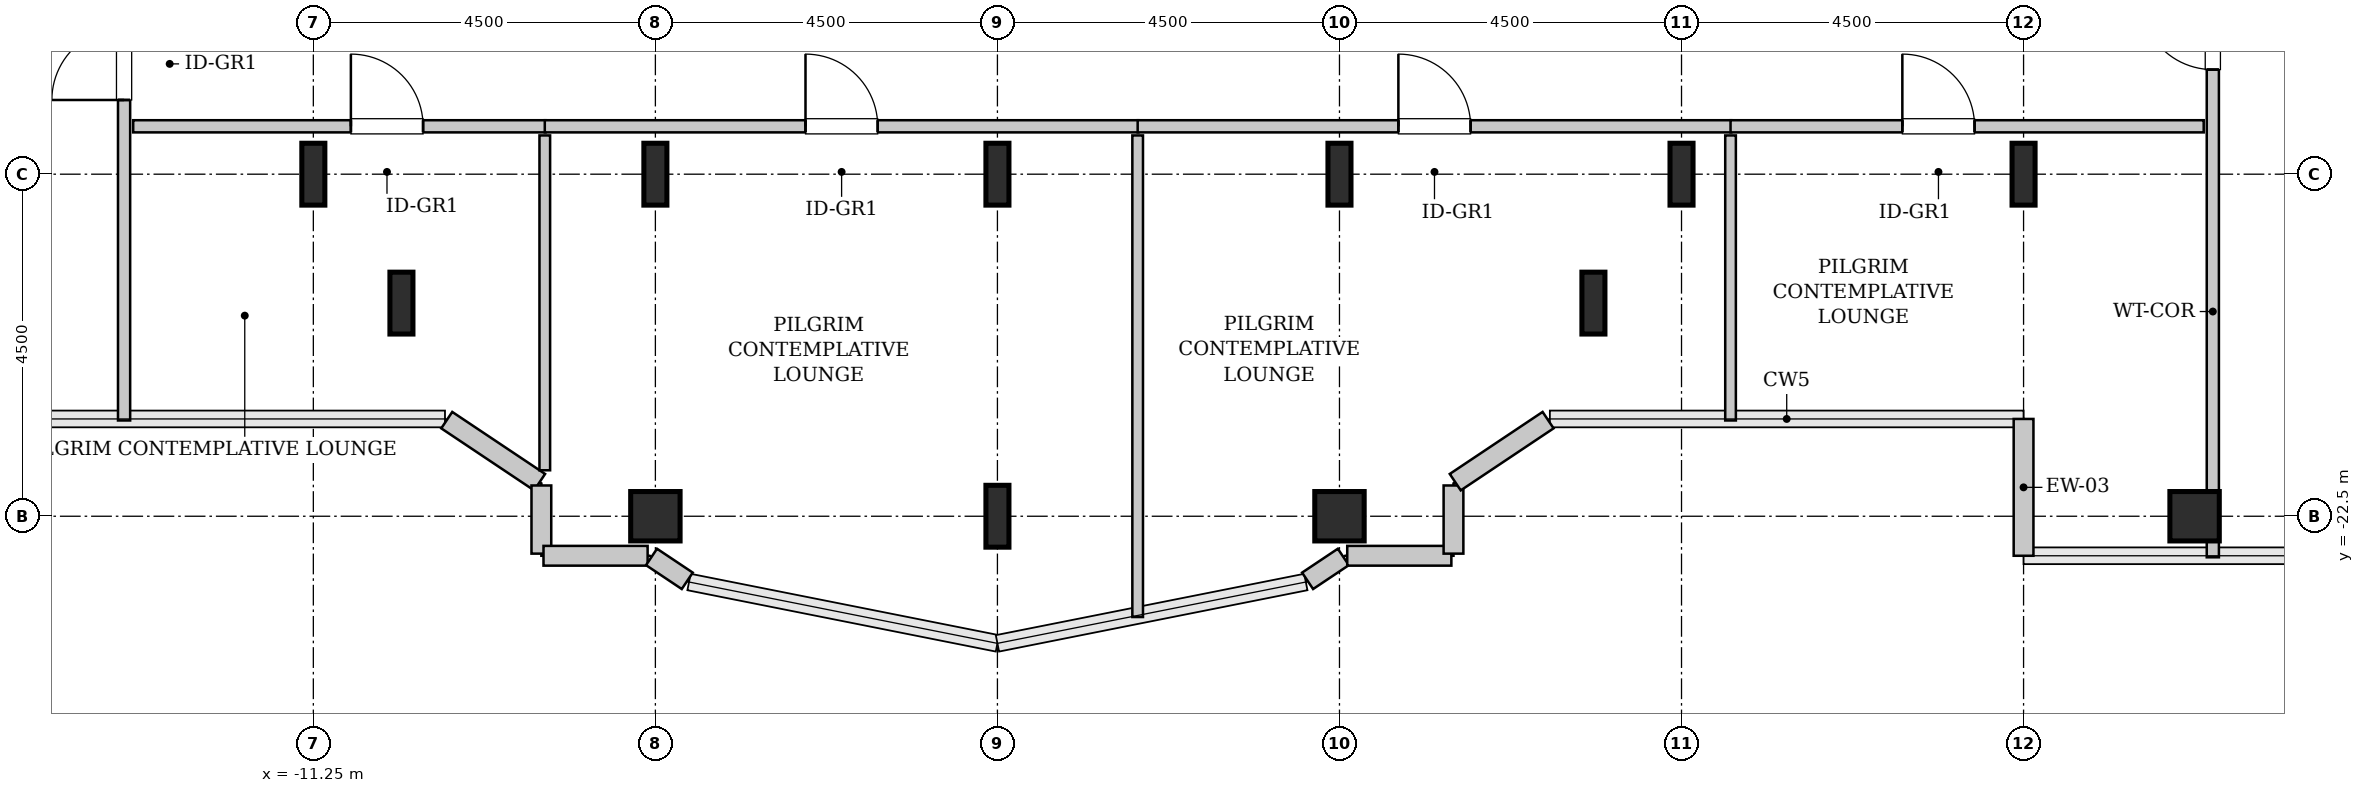
"""IFC4 building model, lengths in metres.
Left out: names, types, materials, properties, quantities, classifications, styles, units other than length and angle.
Written with IfcOpenShell. Run it as: python <this file> out.ifc"""

import sys

from ifc_helpers import new_model, si_unit, direction, frame, frame_2d, origin, origin_2d, place, context, subcontext, project, spatial, rectangle, hollow_rectangle, i_section, extrude, source, transform, mapped, element, fill, save


model = new_model("IFC4")
c1 = context("Model", 3, precision=1e-05, world=origin(), true_north=direction((0.0, 1.0)))
c2 = subcontext(c1, "Body", "Model", "MODEL_VIEW")
j1 = project(units=[si_unit("LENGTHUNIT", "METRE"), si_unit("PLANEANGLEUNIT", "RADIAN")], contexts=[c1])
p1 = place(None, origin())
s1 = spatial("IfcSite", under=j1, at=p1, CompositionType="ELEMENT")
p2 = place(p1, origin())
s2 = spatial("IfcBuilding", under=s1, at=p2, CompositionType="ELEMENT")
p3 = place(p2, frame((0.0, 0.0, 214.2)))
s3 = spatial("IfcBuildingStorey", under=s2, at=p3, CompositionType="ELEMENT", Elevation=214.2)
m1 = source(origin(), c2, "Body", "SweptSolid", [
    extrude(i_section(OverallWidth=0.303, OverallDepth=0.814, WebThickness=0.021, FlangeThickness=0.04, FilletRadius=0.03, at=origin_2d()), origin(), (0.0, 0.0, 1.0), 3.8),
])
for number, where, z_axis, x_axis in (
    (1, (-11.25, -18.0, 0.0), (0.0, 0.0, 1.0), (1.0, 0.0, 0.0)),
    (2, (-10.091, -19.696, 0.0), (0.0, 0.0, 1.0), (1.0, 0.0, 0.0)),
):
    element("IfcColumn", number, at=place(p3, frame(where, z_axis=z_axis, x_axis=x_axis)), inside=s3, PredefinedType="COLUMN", context=c2, shape_type="MappedRepresentation", body=[
        mapped(m1, transform((0.0, 0.0, 0.0), x_axis=(1.0, 0.0, 0.0), y_axis=(0.0, 1.0, 0.0), z_axis=(0.0, 0.0, 1.0), scale=1.0)),
    ])
m2 = source(origin(), c2, "Body", "SweptSolid", [
    extrude(hollow_rectangle(XDim=0.65, YDim=0.65, WallThickness=0.032, InnerFilletRadius=0.032, OuterFilletRadius=0.064, at=origin_2d()), origin(), (0.0, 0.0, 1.0), 3.8),
])
p4 = place(p3, frame((-6.75, -22.5, 0.0), z_axis=(0.0, 0.0, 1.0), x_axis=(1.0, 0.0, 0.0)))
e3 = element("IfcColumn", 3, at=p4, inside=s3, PredefinedType="COLUMN", context=c2, shape_type="MappedRepresentation", body=[
    mapped(m2, transform((0.0, 0.0, 0.0), x_axis=(1.0, 0.0, 0.0), y_axis=(0.0, 1.0, 0.0), z_axis=(0.0, 0.0, 1.0), scale=1.0)),
])
for number, where, z_axis, x_axis in (
    (4, (-6.75, -18.0, 0.0), (0.0, 0.0, 1.0), (1.0, 0.0, 0.0)),
    (5, (-2.25, -22.5, 0.0), (0.0, 0.0, 1.0), (1.0, 0.0, 0.0)),
    (6, (-2.25, -18.0, 0.0), (0.0, 0.0, 1.0), (1.0, 0.0, 0.0)),
):
    element("IfcColumn", number, at=place(p3, frame(where, z_axis=z_axis, x_axis=x_axis)), inside=s3, PredefinedType="COLUMN", context=c2, shape_type="MappedRepresentation", body=[
        mapped(m1, transform((0.0, 0.0, 0.0), x_axis=(1.0, 0.0, 0.0), y_axis=(0.0, 1.0, 0.0), z_axis=(0.0, 0.0, 1.0), scale=1.0)),
    ])
p5 = place(p3, frame((2.25, -22.5, 0.0), z_axis=(0.0, 0.0, 1.0), x_axis=(1.0, 0.0, 0.0)))
e7 = element("IfcColumn", 7, at=p5, inside=s3, PredefinedType="COLUMN", context=c2, shape_type="MappedRepresentation", body=[
    mapped(m2, transform((0.0, 0.0, 0.0), x_axis=(1.0, 0.0, 0.0), y_axis=(0.0, 1.0, 0.0), z_axis=(0.0, 0.0, 1.0), scale=1.0)),
])
for number, where, z_axis, x_axis in (
    (8, (2.25, -18.0, 0.0), (0.0, 0.0, 1.0), (1.0, 0.0, 0.0)),
    (9, (5.591, -19.696, 0.0), (0.0, 0.0, 1.0), (1.0, 0.0, 0.0)),
    (10, (6.75, -18.0, 0.0), (0.0, 0.0, 1.0), (1.0, 0.0, 0.0)),
    (11, (11.25, -18.0, 0.0), (0.0, 0.0, 1.0), (1.0, 0.0, 0.0)),
):
    element("IfcColumn", number, at=place(p3, frame(where, z_axis=z_axis, x_axis=x_axis)), inside=s3, PredefinedType="COLUMN", context=c2, shape_type="MappedRepresentation", body=[
        mapped(m1, transform((0.0, 0.0, 0.0), x_axis=(1.0, 0.0, 0.0), y_axis=(0.0, 1.0, 0.0), z_axis=(0.0, 0.0, 1.0), scale=1.0)),
    ])
p6 = place(p3, frame((13.5, -22.5, 0.0), z_axis=(0.0, 0.0, 1.0), x_axis=(1.0, 0.0, 0.0)))
e12 = element("IfcColumn", 12, at=p6, inside=s3, PredefinedType="COLUMN", context=c2, shape_type="MappedRepresentation", body=[
    mapped(m2, transform((0.0, 0.0, 0.0), x_axis=(1.0, 0.0, 0.0), y_axis=(0.0, 1.0, 0.0), z_axis=(0.0, 0.0, 1.0), scale=1.0)),
])
m3 = source(origin(), c2, "Body", "SweptSolid", [
    extrude(rectangle(XDim=1.8, YDim=0.26, at=frame_2d((0.9, 0.0))), origin(), (0.0, 0.0, 1.0), 3.55),
])
p7 = place(p3, frame((11.25, -21.22, 0.0), z_axis=(0.0, 0.0, 1.0), x_axis=(0.0, -1.0, 0.0)))
e13 = element("IfcWall", 13, at=p7, inside=s3, PredefinedType="SOLIDWALL", context=c2, shape_type="MappedRepresentation", body=[
    mapped(m3, transform((0.0, 0.0, 0.0), x_axis=(1.0, 0.0, 0.0), y_axis=(0.0, 1.0, 0.0), z_axis=(0.0, 0.0, 1.0), scale=1.0)),
])
m4 = source(origin(), c2, "Body", "SweptSolid", [
    extrude(rectangle(XDim=1.469, YDim=0.26, at=frame_2d((0.734, 0.0))), origin(), (0.0, 0.0, 1.0), 3.55),
])
p8 = place(p3, frame((-9.495, -21.236, 0.0), z_axis=(0.0, 0.0, 1.0), x_axis=(0.831461760506, -0.555581983884, 0.0)))
e14 = element("IfcWall", 14, at=p8, inside=s3, PredefinedType="SOLIDWALL", context=c2, shape_type="MappedRepresentation", body=[
    mapped(m4, transform((0.0, 0.0, 0.0), x_axis=(1.0, 0.0, 0.0), y_axis=(0.0, 1.0, 0.0), z_axis=(0.0, 0.0, 1.0), scale=1.0)),
])
m5 = source(origin(), c2, "Body", "SweptSolid", [
    extrude(rectangle(XDim=0.897, YDim=0.26, at=frame_2d((0.448, 0.0))), origin(), (0.0, 0.0, 1.0), 3.55),
])
p9 = place(p3, frame((-8.25, -22.095, 0.0), z_axis=(0.0, 0.0, 1.0), x_axis=(0.0, -1.0, 0.0)))
e15 = element("IfcWall", 15, at=p9, inside=s3, PredefinedType="SOLIDWALL", context=c2, shape_type="MappedRepresentation", body=[
    mapped(m5, transform((0.0, 0.0, 0.0), x_axis=(1.0, 0.0, 0.0), y_axis=(0.0, 1.0, 0.0), z_axis=(0.0, 0.0, 1.0), scale=1.0)),
])
m6 = source(origin(), c2, "Body", "SweptSolid", [
    extrude(rectangle(XDim=1.37, YDim=0.26, at=frame_2d((0.685, 0.0))), origin(), (0.0, 0.0, 1.0), 3.55),
])
p10 = place(p3, frame((-8.222, -23.02, 0.0), z_axis=(0.0, 0.0, 1.0), x_axis=(1.0, 0.0, 0.0)))
e16 = element("IfcWall", 16, at=p10, inside=s3, PredefinedType="SOLIDWALL", context=c2, shape_type="MappedRepresentation", body=[
    mapped(m6, transform((0.0, 0.0, 0.0), x_axis=(1.0, 0.0, 0.0), y_axis=(0.0, 1.0, 0.0), z_axis=(0.0, 0.0, 1.0), scale=1.0)),
])
m7 = source(origin(), c2, "Body", "SweptSolid", [
    extrude(rectangle(XDim=0.565, YDim=0.26, at=frame_2d((0.283, 0.0))), origin(), (0.0, 0.0, 1.0), 3.55),
])
for number, where, z_axis, x_axis in (
    (17, (-6.801, -23.036, 0.0), (0.0, 0.0, 1.0), (0.832, -0.555, 0.0)),
    (18, (1.831, -23.35, 0.0), (0.0, 0.0, 1.0), (0.832, 0.555, 0.0)),
):
    element("IfcWall", number, at=place(p3, frame(where, z_axis=z_axis, x_axis=x_axis)), inside=s3, PredefinedType="SOLIDWALL", context=c2, shape_type="MappedRepresentation", body=[
        mapped(m7, transform((0.0, 0.0, 0.0), x_axis=(1.0, 0.0, 0.0), y_axis=(0.0, 1.0, 0.0), z_axis=(0.0, 0.0, 1.0), scale=1.0)),
    ])
p11 = place(p3, frame((2.352, -23.02, 0.0), z_axis=(0.0, 0.0, 1.0), x_axis=(1.0, 0.0, 0.0)))
e19 = element("IfcWall", 19, at=p11, inside=s3, PredefinedType="SOLIDWALL", context=c2, shape_type="MappedRepresentation", body=[
    mapped(m6, transform((0.0, 0.0, 0.0), x_axis=(1.0, 0.0, 0.0), y_axis=(0.0, 1.0, 0.0), z_axis=(0.0, 0.0, 1.0), scale=1.0)),
])
p12 = place(p3, frame((3.75, -22.992, 0.0), z_axis=(0.0, 0.0, 1.0), x_axis=(0.0, 1.0, 0.0)))
e20 = element("IfcWall", 20, at=p12, inside=s3, PredefinedType="SOLIDWALL", context=c2, shape_type="MappedRepresentation", body=[
    mapped(m5, transform((0.0, 0.0, 0.0), x_axis=(1.0, 0.0, 0.0), y_axis=(0.0, 1.0, 0.0), z_axis=(0.0, 0.0, 1.0), scale=1.0)),
])
p13 = place(p3, frame((3.773, -22.052, 0.0), z_axis=(0.0, 0.0, 1.0), x_axis=(0.831461760506, 0.555581983884, 0.0)))
e21 = element("IfcWall", 21, at=p13, inside=s3, PredefinedType="SOLIDWALL", context=c2, shape_type="MappedRepresentation", body=[
    mapped(m4, transform((0.0, 0.0, 0.0), x_axis=(1.0, 0.0, 0.0), y_axis=(0.0, 1.0, 0.0), z_axis=(0.0, 0.0, 1.0), scale=1.0)),
])
m8 = source(origin(), c2, "Body", "SweptSolid", [
    extrude(rectangle(XDim=5.552, YDim=0.16, at=frame_2d((2.776, 0.0))), origin(), (0.0, 0.0, 1.0), 3.535),
])
p14 = place(p3, frame((-13.74, -21.24, 0.0), z_axis=(0.0, 0.0, 1.0), x_axis=(0.0, 1.0, 0.0)))
e22 = element("IfcWall", 22, at=p14, inside=s3, PredefinedType="PARTITIONING", context=c2, shape_type="MappedRepresentation", body=[
    mapped(m8, transform((0.0, 0.0, 0.0), x_axis=(1.0, 0.0, 0.0), y_axis=(0.0, 1.0, 0.0), z_axis=(0.0, 0.0, 1.0), scale=1.0)),
])
p15 = place(p14, frame((4.216, 0.0, 0.0)))
e23 = element("IfcOpeningElement", 23, at=p15, cuts=e22, PredefinedType="OPENING", context=c2, shape_type="SweptSolid", body=[
    extrude(rectangle(XDim=0.95, YDim=2.1, at=frame_2d((0.475, 1.05))), frame((0.0, 0.09, 0.0), z_axis=(0.0, -1.0, 0.0), x_axis=(1.0, 0.0, 0.0)), (0.0, 0.0, 1.0), 0.18),
])
m9 = source(origin(), c2, "Body", "SweptSolid", [
    extrude(rectangle(XDim=8.153, YDim=0.16, at=frame_2d((4.076, 0.0))), origin(), (0.0, 0.0, 1.0), 3.535),
])
p16 = place(p3, frame((13.74, -23.04, 0.0), z_axis=(0.0, 0.0, 1.0), x_axis=(0.0, 1.0, 0.0)))
e24 = element("IfcWall", 24, at=p16, inside=s3, PredefinedType="PARTITIONING", context=c2, shape_type="MappedRepresentation", body=[
    mapped(m9, transform((0.0, 0.0, 0.0), x_axis=(1.0, 0.0, 0.0), y_axis=(0.0, 1.0, 0.0), z_axis=(0.0, 0.0, 1.0), scale=1.0)),
])
p17 = place(p16, frame((6.416, 0.0, 0.0)))
e25 = element("IfcOpeningElement", 25, at=p17, cuts=e24, PredefinedType="OPENING", context=c2, shape_type="SweptSolid", body=[
    extrude(rectangle(XDim=0.95, YDim=2.1, at=frame_2d((0.475, 1.05))), frame((0.0, 0.09, 0.0), z_axis=(0.0, -1.0, 0.0), x_axis=(1.0, 0.0, 0.0)), (0.0, 0.0, 1.0), 0.18),
])
m10 = source(origin(), c2, "Body", "SweptSolid", [
    extrude(rectangle(XDim=5.425, YDim=0.16, at=frame_2d((2.712, 0.0))), origin(), (0.0, 0.0, 1.0), 3.535),
])
p18 = place(p3, frame((-13.62, -17.37, 0.0), z_axis=(0.0, 0.0, 1.0), x_axis=(1.0, 0.0, 0.0)))
e26 = element("IfcWall", 26, at=p18, inside=s3, PredefinedType="PARTITIONING", context=c2, shape_type="MappedRepresentation", body=[
    mapped(m10, transform((0.0, 0.0, 0.0), x_axis=(1.0, 0.0, 0.0), y_axis=(0.0, 1.0, 0.0), z_axis=(0.0, 0.0, 1.0), scale=1.0)),
])
p19 = place(p18, frame((2.864, 0.0, 0.0)))
e27 = element("IfcOpeningElement", 27, at=p19, cuts=e26, PredefinedType="OPENING", context=c2, shape_type="SweptSolid", body=[
    extrude(rectangle(XDim=0.95, YDim=2.1, at=frame_2d((0.475, 1.05))), frame((0.0, 0.09, 0.0), z_axis=(0.0, -1.0, 0.0), x_axis=(1.0, 0.0, 0.0)), (0.0, 0.0, 1.0), 0.18),
])
m11 = source(origin(), c2, "Body", "SweptSolid", [
    extrude(rectangle(XDim=4.405, YDim=0.14, at=frame_2d((2.203, 0.0))), origin(), (0.0, 0.0, 1.0), 3.535),
])
p20 = place(p3, frame((-8.205, -21.895, 0.0), z_axis=(0.0, 0.0, 1.0), x_axis=(0.0, 1.0, 0.0)))
e28 = element("IfcWall", 28, at=p20, inside=s3, PredefinedType="PARTITIONING", context=c2, shape_type="MappedRepresentation", body=[
    mapped(m11, transform((0.0, 0.0, 0.0), x_axis=(1.0, 0.0, 0.0), y_axis=(0.0, 1.0, 0.0), z_axis=(0.0, 0.0, 1.0), scale=1.0)),
])
m12 = source(origin(), c2, "Body", "SweptSolid", [
    extrude(rectangle(XDim=7.81, YDim=0.16, at=frame_2d((3.905, 0.0))), origin(), (0.0, 0.0, 1.0), 3.535),
])
p21 = place(p3, frame((-8.205, -17.37, 0.0), z_axis=(0.0, 0.0, 1.0), x_axis=(1.0, 0.0, 0.0)))
e29 = element("IfcWall", 29, at=p21, inside=s3, PredefinedType="PARTITIONING", context=c2, shape_type="MappedRepresentation", body=[
    mapped(m12, transform((0.0, 0.0, 0.0), x_axis=(1.0, 0.0, 0.0), y_axis=(0.0, 1.0, 0.0), z_axis=(0.0, 0.0, 1.0), scale=1.0)),
])
p22 = place(p21, frame((3.43, 0.0, 0.0)))
e30 = element("IfcOpeningElement", 30, at=p22, cuts=e29, PredefinedType="OPENING", context=c2, shape_type="SweptSolid", body=[
    extrude(rectangle(XDim=0.95, YDim=2.1, at=frame_2d((0.475, 1.05))), frame((0.0, 0.09, 0.0), z_axis=(0.0, -1.0, 0.0), x_axis=(1.0, 0.0, 0.0)), (0.0, 0.0, 1.0), 0.18),
])
m13 = source(origin(), c2, "Body", "SweptSolid", [
    extrude(rectangle(XDim=6.336, YDim=0.14, at=frame_2d((3.168, 0.0))), origin(), (0.0, 0.0, 1.0), 3.535),
])
p23 = place(p3, frame((-0.405, -23.826, 0.0), z_axis=(0.0, 0.0, 1.0), x_axis=(0.0, 1.0, 0.0)))
e31 = element("IfcWall", 31, at=p23, inside=s3, PredefinedType="PARTITIONING", context=c2, shape_type="MappedRepresentation", body=[
    mapped(m13, transform((0.0, 0.0, 0.0), x_axis=(1.0, 0.0, 0.0), y_axis=(0.0, 1.0, 0.0), z_axis=(0.0, 0.0, 1.0), scale=1.0)),
])
p24 = place(p3, frame((-0.405, -17.37, 0.0), z_axis=(0.0, 0.0, 1.0), x_axis=(1.0, 0.0, 0.0)))
e32 = element("IfcWall", 32, at=p24, inside=s3, PredefinedType="PARTITIONING", context=c2, shape_type="MappedRepresentation", body=[
    mapped(m12, transform((0.0, 0.0, 0.0), x_axis=(1.0, 0.0, 0.0), y_axis=(0.0, 1.0, 0.0), z_axis=(0.0, 0.0, 1.0), scale=1.0)),
])
p25 = place(p24, frame((3.43, 0.0, 0.0)))
e33 = element("IfcOpeningElement", 33, at=p25, cuts=e32, PredefinedType="OPENING", context=c2, shape_type="SweptSolid", body=[
    extrude(rectangle(XDim=0.95, YDim=2.1, at=frame_2d((0.475, 1.05))), frame((0.0, 0.09, 0.0), z_axis=(0.0, -1.0, 0.0), x_axis=(1.0, 0.0, 0.0)), (0.0, 0.0, 1.0), 0.18),
])
m14 = source(origin(), c2, "Body", "SweptSolid", [
    extrude(rectangle(XDim=3.75, YDim=0.14, at=frame_2d((1.875, 0.0))), origin(), (0.0, 0.0, 1.0), 3.535),
])
p26 = place(p3, frame((7.395, -21.24, 0.0), z_axis=(0.0, 0.0, 1.0), x_axis=(0.0, 1.0, 0.0)))
e34 = element("IfcWall", 34, at=p26, inside=s3, PredefinedType="PARTITIONING", context=c2, shape_type="MappedRepresentation", body=[
    mapped(m14, transform((0.0, 0.0, 0.0), x_axis=(1.0, 0.0, 0.0), y_axis=(0.0, 1.0, 0.0), z_axis=(0.0, 0.0, 1.0), scale=1.0)),
])
m15 = source(origin(), c2, "Body", "SweptSolid", [
    extrude(rectangle(XDim=6.225, YDim=0.16, at=frame_2d((3.113, 0.0))), origin(), (0.0, 0.0, 1.0), 3.535),
])
p27 = place(p3, frame((7.395, -17.37, 0.0), z_axis=(0.0, 0.0, 1.0), x_axis=(1.0, 0.0, 0.0)))
e35 = element("IfcWall", 35, at=p27, inside=s3, PredefinedType="PARTITIONING", context=c2, shape_type="MappedRepresentation", body=[
    mapped(m15, transform((0.0, 0.0, 0.0), x_axis=(1.0, 0.0, 0.0), y_axis=(0.0, 1.0, 0.0), z_axis=(0.0, 0.0, 1.0), scale=1.0)),
])
p28 = place(p27, frame((2.26, 0.0, 0.0)))
e36 = element("IfcOpeningElement", 36, at=p28, cuts=e35, PredefinedType="OPENING", context=c2, shape_type="SweptSolid", body=[
    extrude(rectangle(XDim=0.95, YDim=2.1, at=frame_2d((0.475, 1.05))), frame((0.0, 0.09, 0.0), z_axis=(0.0, -1.0, 0.0), x_axis=(1.0, 0.0, 0.0)), (0.0, 0.0, 1.0), 0.18),
])
m16 = source(origin(), c2, "Body", "SweptSolid", [
    extrude(rectangle(XDim=0.95, YDim=2.1, at=frame_2d((0.475, 1.05))), frame((0.0, 0.025, 0.0), z_axis=(0.0, -1.0, 0.0), x_axis=(1.0, 0.0, 0.0)), (0.0, 0.0, 1.0), 0.05),
])
p29 = place(p15, origin())
e37 = element("IfcDoor", 37, at=p29, inside=s3, OperationType="SINGLE_SWING_LEFT", PredefinedType="DOOR", context=c2, shape_type="MappedRepresentation", body=[
    mapped(m16, transform((0.0, 0.0, 0.0), x_axis=(1.0, 0.0, 0.0), y_axis=(0.0, 1.0, 0.0), z_axis=(0.0, 0.0, 1.0), scale=1.0)),
])
fill(e23, e37)
p30 = place(p17, origin())
e38 = element("IfcDoor", 38, at=p30, inside=s3, OperationType="SINGLE_SWING_RIGHT", PredefinedType="DOOR", context=c2, shape_type="MappedRepresentation", body=[
    mapped(m16, transform((0.0, 0.0, 0.0), x_axis=(1.0, 0.0, 0.0), y_axis=(0.0, 1.0, 0.0), z_axis=(0.0, 0.0, 1.0), scale=1.0)),
])
fill(e25, e38)
p31 = place(p19, origin())
e39 = element("IfcDoor", 39, at=p31, inside=s3, OperationType="SINGLE_SWING_LEFT", PredefinedType="DOOR", context=c2, shape_type="MappedRepresentation", body=[
    mapped(m16, transform((0.0, 0.0, 0.0), x_axis=(1.0, 0.0, 0.0), y_axis=(0.0, 1.0, 0.0), z_axis=(0.0, 0.0, 1.0), scale=1.0)),
])
fill(e27, e39)
p32 = place(p22, origin())
e40 = element("IfcDoor", 40, at=p32, inside=s3, OperationType="SINGLE_SWING_LEFT", PredefinedType="DOOR", context=c2, shape_type="MappedRepresentation", body=[
    mapped(m16, transform((0.0, 0.0, 0.0), x_axis=(1.0, 0.0, 0.0), y_axis=(0.0, 1.0, 0.0), z_axis=(0.0, 0.0, 1.0), scale=1.0)),
])
fill(e30, e40)
p33 = place(p25, origin())
e41 = element("IfcDoor", 41, at=p33, inside=s3, OperationType="SINGLE_SWING_LEFT", PredefinedType="DOOR", context=c2, shape_type="MappedRepresentation", body=[
    mapped(m16, transform((0.0, 0.0, 0.0), x_axis=(1.0, 0.0, 0.0), y_axis=(0.0, 1.0, 0.0), z_axis=(0.0, 0.0, 1.0), scale=1.0)),
])
fill(e33, e41)
p34 = place(p28, origin())
e42 = element("IfcDoor", 42, at=p34, inside=s3, OperationType="SINGLE_SWING_LEFT", PredefinedType="DOOR", context=c2, shape_type="MappedRepresentation", body=[
    mapped(m16, transform((0.0, 0.0, 0.0), x_axis=(1.0, 0.0, 0.0), y_axis=(0.0, 1.0, 0.0), z_axis=(0.0, 0.0, 1.0), scale=1.0)),
])
fill(e36, e42)
save(model, sys.argv[1])
